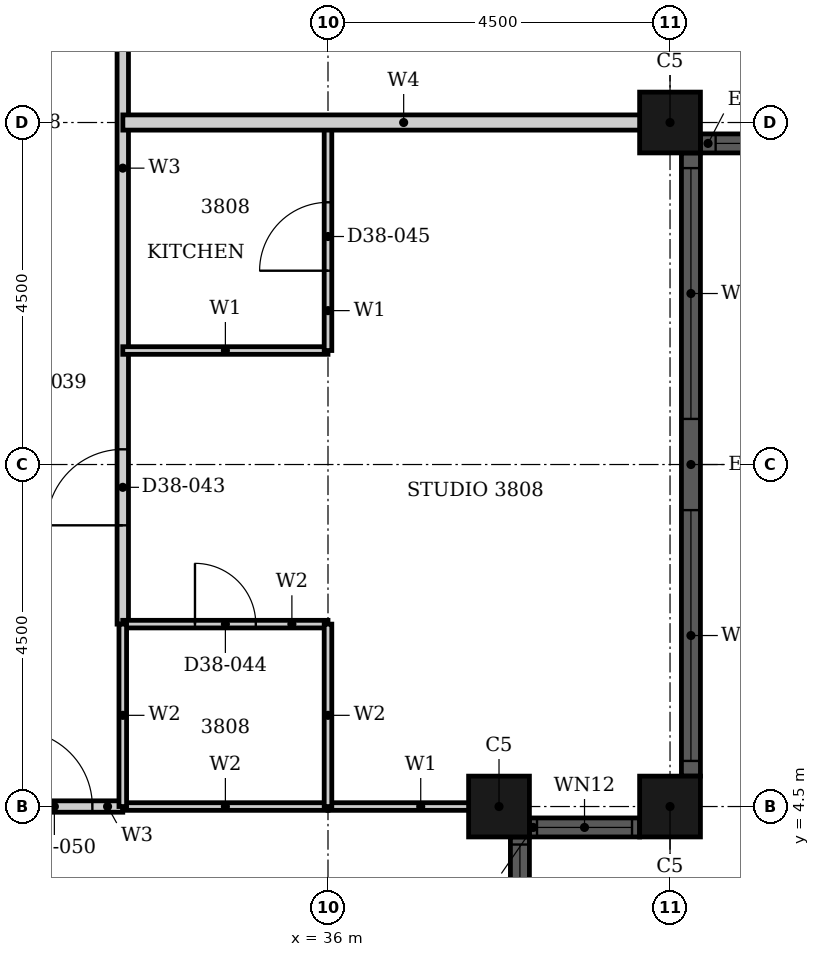
"""IFC4 building model, lengths in metres.
Left out: names, types, materials, properties, quantities, classifications, styles, units other than length and angle.
Written with IfcOpenShell. Run it as: python <this file> out.ifc"""

import sys

from ifc_helpers import new_model, si_unit, direction, frame, frame_2d, origin, origin_2d, place, context, subcontext, project, spatial, rectangle, hollow_rectangle, extrude, element, fill, save


model = new_model("IFC4")
c1 = context("Model", 3, precision=1e-05, world=origin(), true_north=direction((0.0, 1.0)))
c2 = subcontext(c1, "Body", "Model", "MODEL_VIEW")
j1 = project(units=[si_unit("LENGTHUNIT", "METRE"), si_unit("PLANEANGLEUNIT", "RADIAN")], contexts=[c1])
p1 = place(None, origin())
s1 = spatial("IfcSite", under=j1, at=p1, CompositionType="ELEMENT")
p2 = place(p1, origin())
s2 = spatial("IfcBuilding", under=s1, at=p2, CompositionType="ELEMENT")
p3 = place(p2, frame((0.0, 0.0, 154.3)))
s3 = spatial("IfcBuildingStorey", under=s2, at=p3, CompositionType="ELEMENT", Elevation=154.3)
for number, where, z_axis, x_axis in (
    (1, (38.25, 4.5, 0.0), (0.0, 0.0, 1.0), (1.0, 0.0, 0.0)),
    (2, (40.5, 4.5, 0.0), (0.0, 0.0, 1.0), (1.0, 0.0, 0.0)),
    (3, (40.5, 13.5, 0.0), (0.0, 0.0, 1.0), (1.0, 0.0, 0.0)),
):
    element("IfcColumn", number, at=place(p3, frame(where, z_axis=z_axis, x_axis=x_axis)), inside=s3, PredefinedType="COLUMN", context=c2, shape_type="SweptSolid", body=[
        extrude(hollow_rectangle(XDim=0.8, YDim=0.8, WallThickness=0.025, at=origin_2d()), origin(), (0.0, 0.0, 1.0), 3.7),
    ])
p4 = place(p3, frame((38.525, 2.65, 0.0), z_axis=(0.0, 0.0, 1.0), x_axis=(0.0, 1.0, 0.0)))
e4 = element("IfcWall", 4, at=p4, inside=s3, PredefinedType="SOLIDWALL", context=c2, shape_type="SweptSolid", body=[
    extrude(rectangle(XDim=1.45, YDim=0.25, at=frame_2d((0.725, 0.0))), origin(), (0.0, 0.0, 1.0), 3.7),
])
p5 = place(p4, frame((0.1, 0.0, 0.9)))
e5 = element("IfcOpeningElement", 5, at=p5, cuts=e4, PredefinedType="OPENING", context=c2, shape_type="SweptSolid", body=[
    extrude(rectangle(XDim=1.25, YDim=1.85, at=frame_2d((0.625, 0.925))), frame((0.0, 0.135, 0.0), z_axis=(0.0, -1.0, 0.0), x_axis=(1.0, 0.0, 0.0)), (0.0, 0.0, 1.0), 0.27),
])
p6 = place(p3, frame((38.65, 4.225, 0.0), z_axis=(0.0, 0.0, 1.0), x_axis=(1.0, 0.0, 0.0)))
e6 = element("IfcWall", 6, at=p6, inside=s3, PredefinedType="SOLIDWALL", context=c2, shape_type="SweptSolid", body=[
    extrude(rectangle(XDim=1.45, YDim=0.25, at=frame_2d((0.725, 0.0))), origin(), (0.0, 0.0, 1.0), 3.7),
])
p7 = place(p6, frame((0.1, 0.0, 0.9)))
e7 = element("IfcOpeningElement", 7, at=p7, cuts=e6, PredefinedType="OPENING", context=c2, shape_type="SweptSolid", body=[
    extrude(rectangle(XDim=1.25, YDim=2.08, at=frame_2d((0.625, 1.04))), frame((0.0, 0.135, 0.0), z_axis=(0.0, -1.0, 0.0), x_axis=(1.0, 0.0, 0.0)), (0.0, 0.0, 1.0), 0.27),
])
p8 = place(p3, frame((40.775, 4.9, 0.0), z_axis=(0.0, 0.0, 1.0), x_axis=(0.0, 1.0, 0.0)))
e8 = element("IfcWall", 8, at=p8, inside=s3, PredefinedType="SOLIDWALL", context=c2, shape_type="SweptSolid", body=[
    extrude(rectangle(XDim=8.2, YDim=0.25, at=frame_2d((4.1, 0.0))), origin(), (0.0, 0.0, 1.0), 3.7),
])
p9 = place(p8, frame((0.2, 0.0, 0.45)))
e9 = element("IfcOpeningElement", 9, at=p9, cuts=e8, PredefinedType="OPENING", context=c2, shape_type="SweptSolid", body=[
    extrude(rectangle(XDim=3.3, YDim=2.3, at=frame_2d((1.65, 1.15))), frame((0.0, 0.135, 0.0), z_axis=(0.0, -1.0, 0.0), x_axis=(1.0, 0.0, 0.0)), (0.0, 0.0, 1.0), 0.27),
])
p10 = place(p8, frame((4.7, 0.0, 0.45)))
e10 = element("IfcOpeningElement", 10, at=p10, cuts=e8, PredefinedType="OPENING", context=c2, shape_type="SweptSolid", body=[
    extrude(rectangle(XDim=3.3, YDim=2.3, at=frame_2d((1.65, 1.15))), frame((0.0, 0.135, 0.0), z_axis=(0.0, -1.0, 0.0), x_axis=(1.0, 0.0, 0.0)), (0.0, 0.0, 1.0), 0.27),
])
p11 = place(p3, frame((40.9, 13.225, 0.0), z_axis=(0.0, 0.0, 1.0), x_axis=(1.0, 0.0, 0.0)))
e11 = element("IfcWall", 11, at=p11, inside=s3, PredefinedType="SOLIDWALL", context=c2, shape_type="SweptSolid", body=[
    extrude(rectangle(XDim=3.7, YDim=0.25, at=frame_2d((1.85, 0.0))), origin(), (0.0, 0.0, 1.0), 3.7),
])
p12 = place(p11, frame((0.2, 0.0, 0.45)))
e12 = element("IfcOpeningElement", 12, at=p12, cuts=e11, PredefinedType="OPENING", context=c2, shape_type="SweptSolid", body=[
    extrude(rectangle(XDim=3.3, YDim=2.3, at=frame_2d((1.65, 1.15))), frame((0.0, 0.135, 0.0), z_axis=(0.0, -1.0, 0.0), x_axis=(1.0, 0.0, 0.0)), (0.0, 0.0, 1.0), 0.27),
])
p13 = place(p3, frame((31.5, 4.5, 0.0), z_axis=(0.0, 0.0, 1.0), x_axis=(1.0, 0.0, 0.0)))
e13 = element("IfcWall", 13, at=p13, inside=s3, PredefinedType="PARTITIONING", context=c2, shape_type="SweptSolid", body=[
    extrude(rectangle(XDim=1.8, YDim=0.15, at=frame_2d((0.9, 0.0))), origin(), (0.0, 0.0, 1.0), 3.4),
])
p14 = place(p13, frame((0.4, 0.0, 0.0)))
e14 = element("IfcOpeningElement", 14, at=p14, cuts=e13, PredefinedType="OPENING", context=c2, shape_type="SweptSolid", body=[
    extrude(rectangle(XDim=1.0, YDim=2.1, at=frame_2d((0.5, 1.05))), frame((0.0, 0.085, 0.0), z_axis=(0.0, -1.0, 0.0), x_axis=(1.0, 0.0, 0.0)), (0.0, 0.0, 1.0), 0.17),
])
p15 = place(p3, frame((33.3, 6.9, 0.0), z_axis=(0.0, 0.0, 1.0), x_axis=(0.0, 1.0, 0.0)))
e15 = element("IfcWall", 15, at=p15, inside=s3, PredefinedType="PARTITIONING", context=c2, shape_type="SweptSolid", body=[
    extrude(rectangle(XDim=13.799, YDim=0.15, at=frame_2d((6.899, 0.0))), origin(), (0.0, 0.0, 1.0), 3.4),
])
p16 = place(p15, frame((9.699, 0.0, 0.0)))
e16 = element("IfcOpeningElement", 16, at=p16, cuts=e15, PredefinedType="OPENING", context=c2, shape_type="SweptSolid", body=[
    extrude(rectangle(XDim=1.0, YDim=2.2, at=frame_2d((0.5, 1.1))), frame((0.0, 0.085, 0.0), z_axis=(0.0, -1.0, 0.0), x_axis=(1.0, 0.0, 0.0)), (0.0, 0.0, 1.0), 0.17),
])
p17 = place(p15, frame((1.3, 0.0, 0.0)))
e17 = element("IfcOpeningElement", 17, at=p17, cuts=e15, PredefinedType="OPENING", context=c2, shape_type="SweptSolid", body=[
    extrude(rectangle(XDim=1.0, YDim=2.2, at=frame_2d((0.5, 1.1))), frame((0.0, 0.085, 0.0), z_axis=(0.0, -1.0, 0.0), x_axis=(1.0, 0.0, 0.0)), (0.0, 0.0, 1.0), 0.17),
])
p18 = place(p3, frame((33.3, 10.5, 0.0), z_axis=(0.0, 0.0, 1.0), x_axis=(1.0, 0.0, 0.0)))
e18 = element("IfcWall", 18, at=p18, inside=s3, PredefinedType="PARTITIONING", context=c2, shape_type="SweptSolid", body=[
    extrude(rectangle(XDim=2.7, YDim=0.1, at=frame_2d((1.35, 0.0))), origin(), (0.0, 0.0, 1.0), 3.4),
])
p19 = place(p3, frame((36.0, 4.5, 0.0), z_axis=(0.0, 0.0, 1.0), x_axis=(1.0, 0.0, 0.0)))
e19 = element("IfcWall", 19, at=p19, inside=s3, PredefinedType="PARTITIONING", context=c2, shape_type="SweptSolid", body=[
    extrude(rectangle(XDim=2.44, YDim=0.1, at=frame_2d((1.22, 0.0))), origin(), (0.0, 0.0, 1.0), 3.4),
])
p20 = place(p3, frame((36.0, 10.5, 0.0), z_axis=(0.0, 0.0, 1.0), x_axis=(0.0, 1.0, 0.0)))
e20 = element("IfcWall", 20, at=p20, inside=s3, PredefinedType="PARTITIONING", context=c2, shape_type="SweptSolid", body=[
    extrude(rectangle(XDim=3.0, YDim=0.1, at=frame_2d((1.5, 0.0))), origin(), (0.0, 0.0, 1.0), 2.68),
])
p21 = place(p20, frame((1.05, 0.0, 0.0)))
e21 = element("IfcOpeningElement", 21, at=p21, cuts=e20, PredefinedType="OPENING", context=c2, shape_type="SweptSolid", body=[
    extrude(rectangle(XDim=0.9, YDim=2.1, at=frame_2d((0.45, 1.05))), frame((0.0, 0.06, 0.0), z_axis=(0.0, -1.0, 0.0), x_axis=(1.0, 0.0, 0.0)), (0.0, 0.0, 1.0), 0.12),
])
p22 = place(p3, frame((33.301, 13.5, 0.0), z_axis=(0.0, 0.0, 1.0), x_axis=(1.0, 0.0, 0.0)))
e22 = element("IfcWall", 22, at=p22, inside=s3, PredefinedType="PARTITIONING", context=c2, shape_type="SweptSolid", body=[
    extrude(rectangle(XDim=7.389, YDim=0.2, at=frame_2d((3.694, 0.0))), origin(), (0.0, 0.0, 1.0), 2.48),
])
p23 = place(p3, frame((33.3, 4.5, 0.0), z_axis=(0.0, 0.0, 1.0), x_axis=(1.0, 0.0, 0.0)))
e23 = element("IfcWall", 23, at=p23, inside=s3, PredefinedType="PARTITIONING", context=c2, shape_type="SweptSolid", body=[
    extrude(rectangle(XDim=2.7, YDim=0.1, at=frame_2d((1.35, 0.0))), origin(), (0.0, 0.0, 1.0), 3.4),
])
p24 = place(p3, frame((33.3, 6.9, 0.0), z_axis=(0.0, 0.0, 1.0), x_axis=(1.0, 0.0, 0.0)))
e24 = element("IfcWall", 24, at=p24, inside=s3, PredefinedType="PARTITIONING", context=c2, shape_type="SweptSolid", body=[
    extrude(rectangle(XDim=2.7, YDim=0.1, at=frame_2d((1.35, 0.0))), origin(), (0.0, 0.0, 1.0), 3.4),
])
p25 = place(p24, frame((0.95, 0.0, 0.0)))
e25 = element("IfcOpeningElement", 25, at=p25, cuts=e24, PredefinedType="OPENING", context=c2, shape_type="SweptSolid", body=[
    extrude(rectangle(XDim=0.8, YDim=2.1, at=frame_2d((0.4, 1.05))), frame((0.0, 0.06, 0.0), z_axis=(0.0, -1.0, 0.0), x_axis=(1.0, 0.0, 0.0)), (0.0, 0.0, 1.0), 0.12),
])
p26 = place(p3, frame((33.3, 4.5, 0.0), z_axis=(0.0, 0.0, 1.0), x_axis=(0.0, 1.0, 0.0)))
e26 = element("IfcWall", 26, at=p26, inside=s3, PredefinedType="PARTITIONING", context=c2, shape_type="SweptSolid", body=[
    extrude(rectangle(XDim=2.4, YDim=0.1, at=frame_2d((1.2, 0.0))), origin(), (0.0, 0.0, 1.0), 3.4),
])
p27 = place(p3, frame((36.0, 4.5, 0.0), z_axis=(0.0, 0.0, 1.0), x_axis=(0.0, 1.0, 0.0)))
e27 = element("IfcWall", 27, at=p27, inside=s3, PredefinedType="PARTITIONING", context=c2, shape_type="SweptSolid", body=[
    extrude(rectangle(XDim=2.4, YDim=0.1, at=frame_2d((1.2, 0.0))), origin(), (0.0, 0.0, 1.0), 2.68),
])
p28 = place(p5, origin())
e28 = element("IfcWindow", 28, at=p28, inside=s3, PartitioningType="SINGLE_PANEL", PredefinedType="WINDOW", context=c2, shape_type="SweptSolid", body=[
    extrude(rectangle(XDim=1.25, YDim=1.85, at=frame_2d((0.625, 0.925))), frame((0.0, 0.03, 0.0), z_axis=(0.0, -1.0, 0.0), x_axis=(1.0, 0.0, 0.0)), (0.0, 0.0, 1.0), 0.06),
])
fill(e5, e28)
p29 = place(p7, origin())
e29 = element("IfcWindow", 29, at=p29, inside=s3, PartitioningType="SINGLE_PANEL", PredefinedType="WINDOW", context=c2, shape_type="SweptSolid", body=[
    extrude(rectangle(XDim=1.25, YDim=2.08, at=frame_2d((0.625, 1.04))), frame((0.0, 0.03, 0.0), z_axis=(0.0, -1.0, 0.0), x_axis=(1.0, 0.0, 0.0)), (0.0, 0.0, 1.0), 0.06),
])
fill(e7, e29)
p30 = place(p9, origin())
e30 = element("IfcWindow", 30, at=p30, inside=s3, PartitioningType="SINGLE_PANEL", PredefinedType="WINDOW", context=c2, shape_type="SweptSolid", body=[
    extrude(rectangle(XDim=3.3, YDim=2.3, at=frame_2d((1.65, 1.15))), frame((0.0, 0.03, 0.0), z_axis=(0.0, -1.0, 0.0), x_axis=(1.0, 0.0, 0.0)), (0.0, 0.0, 1.0), 0.06),
])
fill(e9, e30)
p31 = place(p10, origin())
e31 = element("IfcWindow", 31, at=p31, inside=s3, PartitioningType="SINGLE_PANEL", PredefinedType="WINDOW", context=c2, shape_type="SweptSolid", body=[
    extrude(rectangle(XDim=3.3, YDim=2.3, at=frame_2d((1.65, 1.15))), frame((0.0, 0.03, 0.0), z_axis=(0.0, -1.0, 0.0), x_axis=(1.0, 0.0, 0.0)), (0.0, 0.0, 1.0), 0.06),
])
fill(e10, e31)
p32 = place(p12, origin())
e32 = element("IfcWindow", 32, at=p32, inside=s3, PartitioningType="SINGLE_PANEL", PredefinedType="WINDOW", context=c2, shape_type="SweptSolid", body=[
    extrude(rectangle(XDim=3.3, YDim=2.3, at=frame_2d((1.65, 1.15))), frame((0.0, 0.03, 0.0), z_axis=(0.0, -1.0, 0.0), x_axis=(1.0, 0.0, 0.0)), (0.0, 0.0, 1.0), 0.06),
])
fill(e12, e32)
p33 = place(p17, origin())
e33 = element("IfcDoor", 33, at=p33, inside=s3, OperationType="SINGLE_SWING_RIGHT", PredefinedType="DOOR", context=c2, shape_type="SweptSolid", body=[
    extrude(rectangle(XDim=1.0, YDim=2.2, at=frame_2d((0.5, 1.1))), frame((0.0, 0.025, 0.0), z_axis=(0.0, -1.0, 0.0), x_axis=(1.0, 0.0, 0.0)), (0.0, 0.0, 1.0), 0.05),
])
fill(e17, e33)
p34 = place(p25, origin())
e34 = element("IfcDoor", 34, at=p34, inside=s3, OperationType="SINGLE_SWING_RIGHT", PredefinedType="DOOR", context=c2, shape_type="SweptSolid", body=[
    extrude(rectangle(XDim=0.8, YDim=2.1, at=frame_2d((0.4, 1.05))), frame((0.0, 0.025, 0.0), z_axis=(0.0, -1.0, 0.0), x_axis=(1.0, 0.0, 0.0)), (0.0, 0.0, 1.0), 0.05),
])
fill(e25, e34)
p35 = place(p21, origin())
e35 = element("IfcDoor", 35, at=p35, inside=s3, OperationType="SINGLE_SWING_LEFT", PredefinedType="DOOR", context=c2, shape_type="SweptSolid", body=[
    extrude(rectangle(XDim=0.9, YDim=2.1, at=frame_2d((0.45, 1.05))), frame((0.0, 0.025, 0.0), z_axis=(0.0, -1.0, 0.0), x_axis=(1.0, 0.0, 0.0)), (0.0, 0.0, 1.0), 0.05),
])
fill(e21, e35)
p36 = place(p14, origin())
e36 = element("IfcDoor", 36, at=p36, inside=s3, OperationType="SINGLE_SWING_RIGHT", PredefinedType="DOOR", context=c2, shape_type="SweptSolid", body=[
    extrude(rectangle(XDim=1.0, YDim=2.1, at=frame_2d((0.5, 1.05))), frame((0.0, 0.025, 0.0), z_axis=(0.0, -1.0, 0.0), x_axis=(1.0, 0.0, 0.0)), (0.0, 0.0, 1.0), 0.05),
])
fill(e14, e36)
save(model, sys.argv[1])
